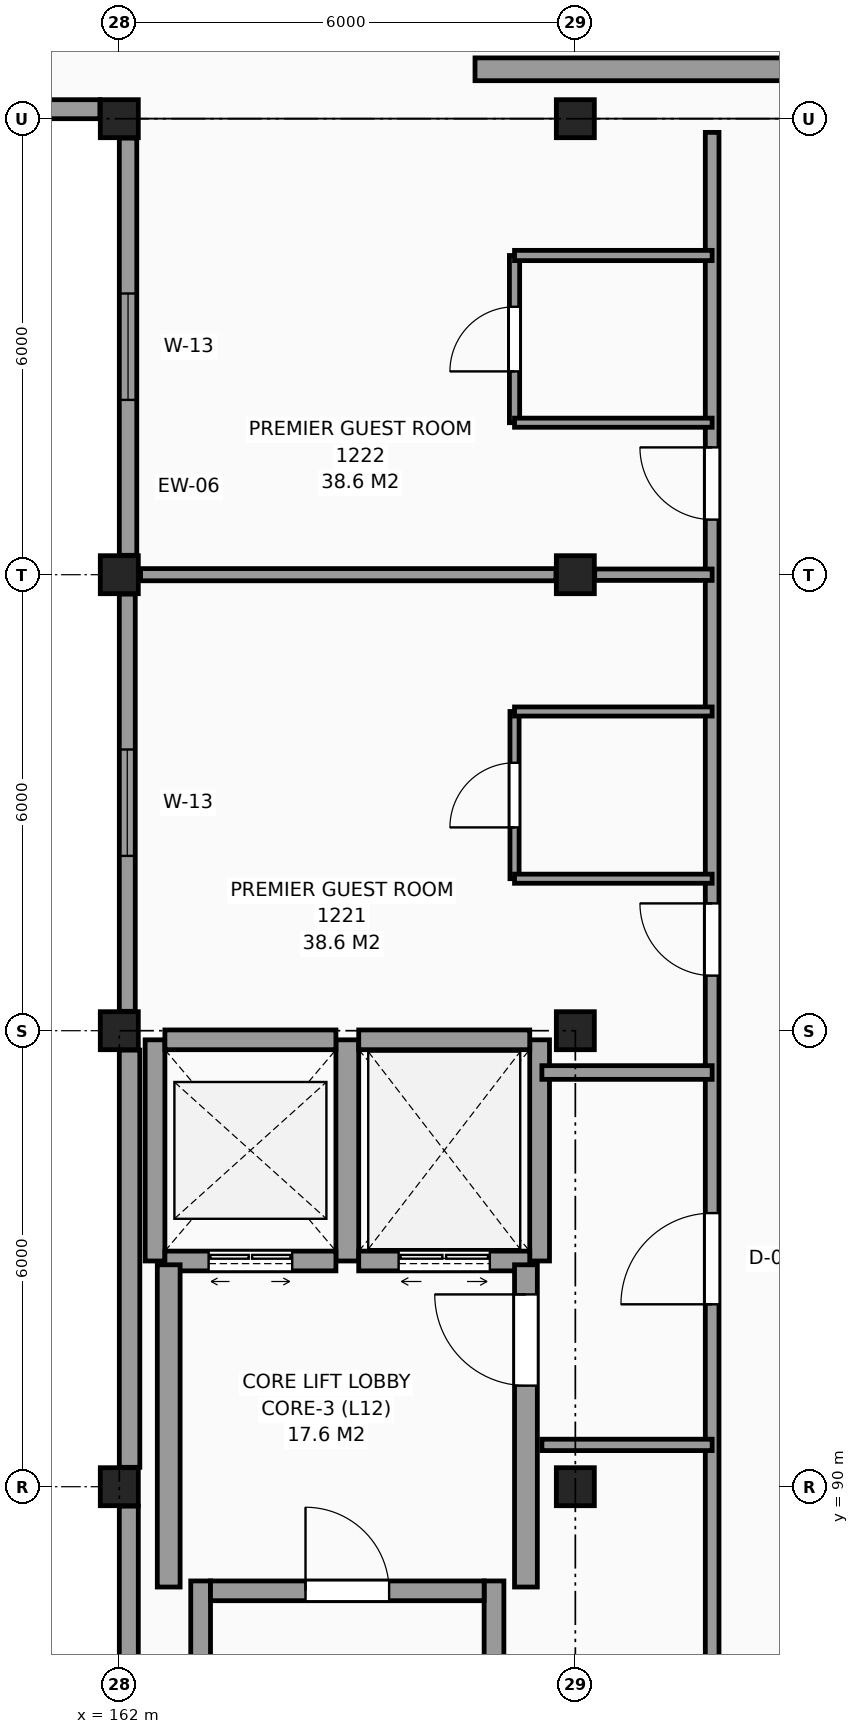
"""IFC4 building model, lengths in metres.
Left out: names, types, materials, properties, quantities, classifications, styles, units other than length and angle.
Written with IfcOpenShell. Run it as: python <this file> out.ifc"""

import sys

from ifc_helpers import new_model, si_unit, direction, frame, frame_2d, origin, origin_2d, place, context, subcontext, project, spatial, rectangle, extrude, element, fill, save


model = new_model("IFC4")
c1 = context("Model", 3, precision=1e-05, world=origin(), true_north=direction((0.0, 1.0)))
c2 = subcontext(c1, "Body", "Model", "MODEL_VIEW")
j1 = project(units=[si_unit("LENGTHUNIT", "METRE"), si_unit("PLANEANGLEUNIT", "RADIAN")], contexts=[c1])
p1 = place(None, origin())
s1 = spatial("IfcSite", under=j1, at=p1, CompositionType="ELEMENT")
p2 = place(p1, origin())
s2 = spatial("IfcBuilding", under=s1, at=p2, CompositionType="ELEMENT")
p3 = place(p2, frame((0.0, 0.0, 48.0)))
s3 = spatial("IfcBuildingStorey", under=s2, at=p3, CompositionType="ELEMENT", Elevation=48.0)
for number, where, z_axis, x_axis in (
    (1, (162.0, 90.0, 0.0), (0.0, 0.0, 1.0), (1.0, 0.0, 0.0)),
    (2, (162.0, 96.0, 0.0), (0.0, 0.0, 1.0), (1.0, 0.0, 0.0)),
    (3, (162.0, 102.0, 0.0), (0.0, 0.0, 1.0), (1.0, 0.0, 0.0)),
    (4, (162.0, 108.0, 0.0), (0.0, 0.0, 1.0), (1.0, 0.0, 0.0)),
    (5, (168.0, 90.0, 0.0), (0.0, 0.0, 1.0), (1.0, 0.0, 0.0)),
    (6, (168.0, 96.0, 0.0), (0.0, 0.0, 1.0), (1.0, 0.0, 0.0)),
    (7, (168.0, 102.0, 0.0), (0.0, 0.0, 1.0), (1.0, 0.0, 0.0)),
    (8, (168.0, 108.0, 0.0), (0.0, 0.0, 1.0), (1.0, 0.0, 0.0)),
):
    element("IfcColumn", number, at=place(p3, frame(where, z_axis=z_axis, x_axis=x_axis)), inside=s3, PredefinedType="COLUMN", context=c2, shape_type="SweptSolid", body=[
        extrude(rectangle(XDim=0.5, YDim=0.5, at=origin_2d()), origin(), (0.0, 0.0, 1.0), 3.3),
    ])
p4 = place(p3, frame((156.255, 108.125, 0.0), z_axis=(0.0, 0.0, 1.0), x_axis=(1.0, 0.0, 0.0)))
e9 = element("IfcWall", 9, at=p4, inside=s3, PredefinedType="SOLIDWALL", context=c2, shape_type="SweptSolid", body=[
    extrude(rectangle(XDim=5.49, YDim=0.25, at=frame_2d((2.745, 0.0))), origin(), (0.0, 0.0, 1.0), 3.05),
])
p5 = place(p3, frame((162.115, 107.745, 0.0), z_axis=(0.0, 0.0, 1.0), x_axis=(0.0, -1.0, 0.0)))
e10 = element("IfcWall", 10, at=p5, inside=s3, PredefinedType="SOLIDWALL", context=c2, shape_type="SweptSolid", body=[
    extrude(rectangle(XDim=5.49, YDim=0.23, at=frame_2d((2.745, 0.0))), origin(), (0.0, 0.0, 1.0), 2.4),
])
p6 = place(p5, frame((2.045, 0.0, 0.8)))
e11 = element("IfcOpeningElement", 11, at=p6, cuts=e10, PredefinedType="OPENING", context=c2, shape_type="SweptSolid", body=[
    extrude(rectangle(XDim=1.4, YDim=1.4, at=frame_2d((0.7, 0.7))), frame((0.0, 0.125, 0.0), z_axis=(0.0, -1.0, 0.0), x_axis=(1.0, 0.0, 0.0)), (0.0, 0.0, 1.0), 0.25),
])
p7 = place(p3, frame((162.105, 101.745, 0.0), z_axis=(0.0, 0.0, 1.0), x_axis=(0.0, -1.0, 0.0)))
e12 = element("IfcWall", 12, at=p7, inside=s3, PredefinedType="SOLIDWALL", context=c2, shape_type="SweptSolid", body=[
    extrude(rectangle(XDim=5.49, YDim=0.21, at=frame_2d((2.745, 0.0))), origin(), (0.0, 0.0, 1.0), 2.4),
])
p8 = place(p7, frame((2.045, 0.0, 0.8)))
e13 = element("IfcOpeningElement", 13, at=p8, cuts=e12, PredefinedType="OPENING", context=c2, shape_type="SweptSolid", body=[
    extrude(rectangle(XDim=1.4, YDim=1.4, at=frame_2d((0.7, 0.7))), frame((0.0, 0.115, 0.0), z_axis=(0.0, -1.0, 0.0), x_axis=(1.0, 0.0, 0.0)), (0.0, 0.0, 1.0), 0.23),
])
p9 = place(p3, frame((162.135, 95.745, 0.0), z_axis=(0.0, 0.0, 1.0), x_axis=(0.0, -1.0, 0.0)))
e14 = element("IfcWall", 14, at=p9, inside=s3, PredefinedType="SOLIDWALL", context=c2, shape_type="SweptSolid", body=[
    extrude(rectangle(XDim=5.49, YDim=0.27, at=frame_2d((2.745, 0.0))), origin(), (0.0, 0.0, 1.0), 2.4),
])
p10 = place(p3, frame((162.125, 89.745, 0.0), z_axis=(0.0, 0.0, 1.0), x_axis=(0.0, -1.0, 0.0)))
e15 = element("IfcWall", 15, at=p10, inside=s3, PredefinedType="SOLIDWALL", context=c2, shape_type="SweptSolid", body=[
    extrude(rectangle(XDim=5.49, YDim=0.25, at=frame_2d((2.745, 0.0))), origin(), (0.0, 0.0, 1.0), 2.4),
])
p11 = place(p3, frame((166.68, 108.65, 0.0), z_axis=(0.0, 0.0, 1.0), x_axis=(1.0, 0.0, 0.0)))
e16 = element("IfcWall", 16, at=p11, inside=s3, PredefinedType="SHEAR", context=c2, shape_type="SweptSolid", body=[
    extrude(rectangle(XDim=4.24, YDim=0.3, at=frame_2d((2.12, 0.0))), origin(), (0.0, 0.0, 1.0), 3.3),
])
for number, where, z_axis, x_axis in (
    (17, (163.07, 78.04, 0.0), (0.0, 0.0, 1.0), (0.0, 1.0, 0.0)),
    (18, (166.93, 78.04, 0.0), (0.0, 0.0, 1.0), (0.0, 1.0, 0.0)),
):
    element("IfcWall", number, at=place(p3, frame(where, z_axis=z_axis, x_axis=x_axis)), inside=s3, PredefinedType="SHEAR", context=c2, shape_type="SweptSolid", body=[
        extrude(rectangle(XDim=10.72, YDim=0.26, at=frame_2d((5.36, 0.0))), origin(), (0.0, 0.0, 1.0), 3.3),
    ])
p12 = place(p3, frame((163.2, 88.63, 0.0), z_axis=(0.0, 0.0, 1.0), x_axis=(1.0, 0.0, 0.0)))
e19 = element("IfcWall", 19, at=p12, inside=s3, PredefinedType="SHEAR", context=c2, shape_type="SweptSolid", body=[
    extrude(rectangle(XDim=3.6, YDim=0.26, at=frame_2d((1.8, 0.0))), origin(), (0.0, 0.0, 1.0), 3.3),
])
p13 = place(p12, frame((1.25, 0.0, 0.0)))
e20 = element("IfcOpeningElement", 20, at=p13, cuts=e19, PredefinedType="OPENING", context=c2, shape_type="SweptSolid", body=[
    extrude(rectangle(XDim=1.1, YDim=2.15, at=frame_2d((0.55, 1.075))), frame((0.0, 0.14, 0.0), z_axis=(0.0, -1.0, 0.0), x_axis=(1.0, 0.0, 0.0)), (0.0, 0.0, 1.0), 0.28),
])
p14 = place(p3, frame((162.47, 92.97, 0.0), z_axis=(0.0, 0.0, 1.0), x_axis=(0.0, 1.0, 0.0)))
e21 = element("IfcWall", 21, at=p14, inside=s3, PredefinedType="SHEAR", context=c2, shape_type="SweptSolid", body=[
    extrude(rectangle(XDim=2.91, YDim=0.26, at=frame_2d((1.455, 0.0))), origin(), (0.0, 0.0, 1.0), 3.3),
])
p15 = place(p3, frame((165.0, 92.97, 0.0), z_axis=(0.0, 0.0, 1.0), x_axis=(0.0, 1.0, 0.0)))
e22 = element("IfcWall", 22, at=p15, inside=s3, PredefinedType="SHEAR", context=c2, shape_type="SweptSolid", body=[
    extrude(rectangle(XDim=2.91, YDim=0.3, at=frame_2d((1.455, 0.0))), origin(), (0.0, 0.0, 1.0), 3.3),
])
p16 = place(p3, frame((162.6, 95.88, 0.0), z_axis=(0.0, 0.0, 1.0), x_axis=(1.0, 0.0, 0.0)))
e23 = element("IfcWall", 23, at=p16, inside=s3, PredefinedType="SHEAR", context=c2, shape_type="SweptSolid", body=[
    extrude(rectangle(XDim=2.25, YDim=0.26, at=frame_2d((1.125, 0.0))), origin(), (0.0, 0.0, 1.0), 3.3),
])
p17 = place(p3, frame((162.6, 92.97, 0.0), z_axis=(0.0, 0.0, 1.0), x_axis=(1.0, 0.0, 0.0)))
e24 = element("IfcWall", 24, at=p17, inside=s3, PredefinedType="SHEAR", context=c2, shape_type="SweptSolid", body=[
    extrude(rectangle(XDim=2.25, YDim=0.26, at=frame_2d((1.125, 0.0))), origin(), (0.0, 0.0, 1.0), 3.3),
])
p18 = place(p17, frame((0.575, 0.0, 0.0)))
e25 = element("IfcOpeningElement", 25, at=p18, cuts=e24, PredefinedType="OPENING", context=c2, shape_type="SweptSolid", body=[
    extrude(rectangle(XDim=1.1, YDim=2.2, at=frame_2d((0.55, 1.1))), frame((0.0, 0.14, 0.0), z_axis=(0.0, -1.0, 0.0), x_axis=(1.0, 0.0, 0.0)), (0.0, 0.0, 1.0), 0.28),
])
p19 = place(p3, frame((167.53, 92.97, 0.0), z_axis=(0.0, 0.0, 1.0), x_axis=(0.0, 1.0, 0.0)))
e26 = element("IfcWall", 26, at=p19, inside=s3, PredefinedType="SHEAR", context=c2, shape_type="SweptSolid", body=[
    extrude(rectangle(XDim=2.91, YDim=0.26, at=frame_2d((1.455, 0.0))), origin(), (0.0, 0.0, 1.0), 3.3),
])
p20 = place(p3, frame((165.15, 95.88, 0.0), z_axis=(0.0, 0.0, 1.0), x_axis=(1.0, 0.0, 0.0)))
e27 = element("IfcWall", 27, at=p20, inside=s3, PredefinedType="SHEAR", context=c2, shape_type="SweptSolid", body=[
    extrude(rectangle(XDim=2.25, YDim=0.26, at=frame_2d((1.125, 0.0))), origin(), (0.0, 0.0, 1.0), 3.3),
])
p21 = place(p3, frame((165.15, 92.97, 0.0), z_axis=(0.0, 0.0, 1.0), x_axis=(1.0, 0.0, 0.0)))
e28 = element("IfcWall", 28, at=p21, inside=s3, PredefinedType="SHEAR", context=c2, shape_type="SweptSolid", body=[
    extrude(rectangle(XDim=2.25, YDim=0.26, at=frame_2d((1.125, 0.0))), origin(), (0.0, 0.0, 1.0), 3.3),
])
p22 = place(p21, frame((0.525, 0.0, 0.0)))
e29 = element("IfcOpeningElement", 29, at=p22, cuts=e28, PredefinedType="OPENING", context=c2, shape_type="SweptSolid", body=[
    extrude(rectangle(XDim=1.2, YDim=2.25, at=frame_2d((0.6, 1.125))), frame((0.0, 0.14, 0.0), z_axis=(0.0, -1.0, 0.0), x_axis=(1.0, 0.0, 0.0)), (0.0, 0.0, 1.0), 0.28),
])
p23 = place(p3, frame((167.35, 88.68, 0.0), z_axis=(0.0, 0.0, 1.0), x_axis=(0.0, 1.0, 0.0)))
e30 = element("IfcWall", 30, at=p23, inside=s3, PredefinedType="SHEAR", context=c2, shape_type="SweptSolid", body=[
    extrude(rectangle(XDim=4.24, YDim=0.3, at=frame_2d((2.12, 0.0))), origin(), (0.0, 0.0, 1.0), 3.3),
])
p24 = place(p23, frame((2.65, 0.0, 0.0)))
e31 = element("IfcOpeningElement", 31, at=p24, cuts=e30, PredefinedType="OPENING", context=c2, shape_type="SweptSolid", body=[
    extrude(rectangle(XDim=1.2, YDim=2.2, at=frame_2d((0.6, 1.1))), frame((0.0, 0.16, 0.0), z_axis=(0.0, -1.0, 0.0), x_axis=(1.0, 0.0, 0.0)), (0.0, 0.0, 1.0), 0.32),
])
p25 = place(p3, frame((162.65, 88.68, 0.0), z_axis=(0.0, 0.0, 1.0), x_axis=(0.0, 1.0, 0.0)))
e32 = element("IfcWall", 32, at=p25, inside=s3, PredefinedType="SHEAR", context=c2, shape_type="SweptSolid", body=[
    extrude(rectangle(XDim=4.24, YDim=0.3, at=frame_2d((2.12, 0.0))), origin(), (0.0, 0.0, 1.0), 3.3),
])
p26 = place(p3, frame((167.2, 98.0, 0.0), z_axis=(0.0, 0.0, 1.0), x_axis=(0.0, 1.0, 0.0)))
e33 = element("IfcWall", 33, at=p26, inside=s3, PredefinedType="PARTITIONING", context=c2, shape_type="SweptSolid", body=[
    extrude(rectangle(XDim=2.2, YDim=0.12, at=frame_2d((1.1, 0.0))), origin(), (0.0, 0.0, 1.0), 3.05),
])
p27 = place(p26, frame((0.675, 0.0, 0.0)))
e34 = element("IfcOpeningElement", 34, at=p27, cuts=e33, PredefinedType="OPENING", context=c2, shape_type="SweptSolid", body=[
    extrude(rectangle(XDim=0.85, YDim=2.1, at=frame_2d((0.425, 1.05))), frame((0.0, 0.07, 0.0), z_axis=(0.0, -1.0, 0.0), x_axis=(1.0, 0.0, 0.0)), (0.0, 0.0, 1.0), 0.14),
])
p28 = place(p3, frame((167.2, 104.0, 0.0), z_axis=(0.0, 0.0, 1.0), x_axis=(0.0, 1.0, 0.0)))
e35 = element("IfcWall", 35, at=p28, inside=s3, PredefinedType="PARTITIONING", context=c2, shape_type="SweptSolid", body=[
    extrude(rectangle(XDim=2.2, YDim=0.135, at=frame_2d((1.1, 0.0))), origin(), (0.0, 0.0, 1.0), 3.05),
])
p29 = place(p28, frame((0.675, 0.0, 0.0)))
e36 = element("IfcOpeningElement", 36, at=p29, cuts=e35, PredefinedType="OPENING", context=c2, shape_type="SweptSolid", body=[
    extrude(rectangle(XDim=0.85, YDim=2.1, at=frame_2d((0.425, 1.05))), frame((0.0, 0.078, 0.0), z_axis=(0.0, -1.0, 0.0), x_axis=(1.0, 0.0, 0.0)), (0.0, 0.0, 1.0), 0.155),
])
p30 = place(p3, frame((169.8, 66.235, 0.0), z_axis=(0.0, 0.0, 1.0), x_axis=(0.0, 1.0, 0.0)))
e37 = element("IfcWall", 37, at=p30, inside=s3, PredefinedType="PARTITIONING", context=c2, shape_type="SweptSolid", body=[
    extrude(rectangle(XDim=41.585, YDim=0.18, at=frame_2d((20.792, 0.0))), origin(), (0.0, 0.0, 1.0), 3.05),
])
p31 = place(p30, frame((26.165, 0.0, 0.0)))
e38 = element("IfcOpeningElement", 38, at=p31, cuts=e37, PredefinedType="OPENING", context=c2, shape_type="SweptSolid", body=[
    extrude(rectangle(XDim=1.2, YDim=2.2, at=frame_2d((0.6, 1.1))), frame((0.0, 0.1, 0.0), z_axis=(0.0, -1.0, 0.0), x_axis=(1.0, 0.0, 0.0)), (0.0, 0.0, 1.0), 0.2),
])
p32 = place(p30, frame((0.44, 0.0, 0.0)))
e39 = element("IfcOpeningElement", 39, at=p32, cuts=e37, PredefinedType="OPENING", context=c2, shape_type="SweptSolid", body=[
    extrude(rectangle(XDim=0.95, YDim=2.1, at=frame_2d((0.475, 1.05))), frame((0.0, 0.1, 0.0), z_axis=(0.0, -1.0, 0.0), x_axis=(1.0, 0.0, 0.0)), (0.0, 0.0, 1.0), 0.2),
])
p33 = place(p30, frame((6.49, 0.0, 0.0)))
e40 = element("IfcOpeningElement", 40, at=p33, cuts=e37, PredefinedType="OPENING", context=c2, shape_type="SweptSolid", body=[
    extrude(rectangle(XDim=0.95, YDim=2.1, at=frame_2d((0.475, 1.05))), frame((0.0, 0.1, 0.0), z_axis=(0.0, -1.0, 0.0), x_axis=(1.0, 0.0, 0.0)), (0.0, 0.0, 1.0), 0.2),
])
p34 = place(p30, frame((30.49, 0.0, 0.0)))
e41 = element("IfcOpeningElement", 41, at=p34, cuts=e37, PredefinedType="OPENING", context=c2, shape_type="SweptSolid", body=[
    extrude(rectangle(XDim=0.95, YDim=2.1, at=frame_2d((0.475, 1.05))), frame((0.0, 0.1, 0.0), z_axis=(0.0, -1.0, 0.0), x_axis=(1.0, 0.0, 0.0)), (0.0, 0.0, 1.0), 0.2),
])
p35 = place(p30, frame((36.49, 0.0, 0.0)))
e42 = element("IfcOpeningElement", 42, at=p35, cuts=e37, PredefinedType="OPENING", context=c2, shape_type="SweptSolid", body=[
    extrude(rectangle(XDim=0.95, YDim=2.1, at=frame_2d((0.475, 1.05))), frame((0.0, 0.1, 0.0), z_axis=(0.0, -1.0, 0.0), x_axis=(1.0, 0.0, 0.0)), (0.0, 0.0, 1.0), 0.2),
])
p36 = place(p3, frame((167.56, 90.55, 0.0), z_axis=(0.0, 0.0, 1.0), x_axis=(1.0, 0.0, 0.0)))
e43 = element("IfcWall", 43, at=p36, inside=s3, PredefinedType="PARTITIONING", context=c2, shape_type="SweptSolid", body=[
    extrude(rectangle(XDim=2.24, YDim=0.15, at=frame_2d((1.12, 0.0))), origin(), (0.0, 0.0, 1.0), 3.05),
])
p37 = place(p3, frame((167.56, 95.45, 0.0), z_axis=(0.0, 0.0, 1.0), x_axis=(1.0, 0.0, 0.0)))
e44 = element("IfcWall", 44, at=p37, inside=s3, PredefinedType="PARTITIONING", context=c2, shape_type="SweptSolid", body=[
    extrude(rectangle(XDim=2.24, YDim=0.18, at=frame_2d((1.12, 0.0))), origin(), (0.0, 0.0, 1.0), 3.05),
])
for number, where, z_axis, x_axis in (
    (45, (167.2, 98.0, 0.0), (0.0, 0.0, 1.0), (1.0, 0.0, 0.0)),
    (46, (167.2, 100.2, 0.0), (0.0, 0.0, 1.0), (1.0, 0.0, 0.0)),
):
    element("IfcWall", number, at=place(p3, frame(where, z_axis=z_axis, x_axis=x_axis)), inside=s3, PredefinedType="PARTITIONING", context=c2, shape_type="SweptSolid", body=[
        extrude(rectangle(XDim=2.6, YDim=0.12, at=frame_2d((1.3, 0.0))), origin(), (0.0, 0.0, 1.0), 3.05),
    ])
p38 = place(p3, frame((162.28, 102.0, 0.0), z_axis=(0.0, 0.0, 1.0), x_axis=(1.0, 0.0, 0.0)))
e47 = element("IfcWall", 47, at=p38, inside=s3, PredefinedType="PARTITIONING", context=c2, shape_type="SweptSolid", body=[
    extrude(rectangle(XDim=5.465, YDim=0.16, at=frame_2d((2.732, 0.0))), origin(), (0.0, 0.0, 1.0), 2.25),
])
p39 = place(p3, frame((168.255, 102.0, 0.0), z_axis=(0.0, 0.0, 1.0), x_axis=(1.0, 0.0, 0.0)))
e48 = element("IfcWall", 48, at=p39, inside=s3, PredefinedType="PARTITIONING", context=c2, shape_type="SweptSolid", body=[
    extrude(rectangle(XDim=1.545, YDim=0.15, at=frame_2d((0.772, 0.0))), origin(), (0.0, 0.0, 1.0), 2.35),
])
p40 = place(p3, frame((167.2, 104.0, 0.0), z_axis=(0.0, 0.0, 1.0), x_axis=(1.0, 0.0, 0.0)))
e49 = element("IfcWall", 49, at=p40, inside=s3, PredefinedType="PARTITIONING", context=c2, shape_type="SweptSolid", body=[
    extrude(rectangle(XDim=2.6, YDim=0.12, at=frame_2d((1.3, 0.0))), origin(), (0.0, 0.0, 1.0), 3.05),
])
p41 = place(p3, frame((167.2, 106.2, 0.0), z_axis=(0.0, 0.0, 1.0), x_axis=(1.0, 0.0, 0.0)))
e50 = element("IfcWall", 50, at=p41, inside=s3, PredefinedType="PARTITIONING", context=c2, shape_type="SweptSolid", body=[
    extrude(rectangle(XDim=2.6, YDim=0.135, at=frame_2d((1.3, 0.0))), origin(), (0.0, 0.0, 1.0), 3.05),
])
p42 = place(p8, origin())
e51 = element("IfcWindow", 51, at=p42, inside=s3, PartitioningType="SINGLE_PANEL", PredefinedType="WINDOW", context=c2, shape_type="SweptSolid", body=[
    extrude(rectangle(XDim=1.4, YDim=1.4, at=frame_2d((0.7, 0.7))), frame((0.0, 0.03, 0.0), z_axis=(0.0, -1.0, 0.0), x_axis=(1.0, 0.0, 0.0)), (0.0, 0.0, 1.0), 0.06),
])
fill(e13, e51)
p43 = place(p6, origin())
e52 = element("IfcWindow", 52, at=p43, inside=s3, PartitioningType="SINGLE_PANEL", PredefinedType="WINDOW", context=c2, shape_type="SweptSolid", body=[
    extrude(rectangle(XDim=1.4, YDim=1.4, at=frame_2d((0.7, 0.7))), frame((0.0, 0.03, 0.0), z_axis=(0.0, -1.0, 0.0), x_axis=(1.0, 0.0, 0.0)), (0.0, 0.0, 1.0), 0.06),
])
fill(e11, e52)
p44 = place(p13, origin())
e53 = element("IfcDoor", 53, at=p44, inside=s3, OperationType="SINGLE_SWING_LEFT", PredefinedType="DOOR", context=c2, shape_type="SweptSolid", body=[
    extrude(rectangle(XDim=1.1, YDim=2.15, at=frame_2d((0.55, 1.075))), frame((0.0, 0.025, 0.0), z_axis=(0.0, -1.0, 0.0), x_axis=(1.0, 0.0, 0.0)), (0.0, 0.0, 1.0), 0.05),
])
fill(e20, e53)
p45 = place(p18, origin())
e54 = element("IfcDoor", 54, at=p45, inside=s3, OperationType="DOUBLE_DOOR_SLIDING", PredefinedType="DOOR", context=c2, shape_type="SweptSolid", body=[
    extrude(rectangle(XDim=1.1, YDim=2.2, at=frame_2d((0.55, 1.1))), frame((0.0, 0.025, 0.0), z_axis=(0.0, -1.0, 0.0), x_axis=(1.0, 0.0, 0.0)), (0.0, 0.0, 1.0), 0.05),
])
fill(e25, e54)
p46 = place(p22, origin())
e55 = element("IfcDoor", 55, at=p46, inside=s3, OperationType="DOUBLE_DOOR_SLIDING", PredefinedType="DOOR", context=c2, shape_type="SweptSolid", body=[
    extrude(rectangle(XDim=1.2, YDim=2.25, at=frame_2d((0.6, 1.125))), frame((0.0, 0.025, 0.0), z_axis=(0.0, -1.0, 0.0), x_axis=(1.0, 0.0, 0.0)), (0.0, 0.0, 1.0), 0.05),
])
fill(e29, e55)
p47 = place(p24, origin())
e56 = element("IfcDoor", 56, at=p47, inside=s3, OperationType="SINGLE_SWING_RIGHT", PredefinedType="DOOR", context=c2, shape_type="SweptSolid", body=[
    extrude(rectangle(XDim=1.2, YDim=2.2, at=frame_2d((0.6, 1.1))), frame((0.0, 0.025, 0.0), z_axis=(0.0, -1.0, 0.0), x_axis=(1.0, 0.0, 0.0)), (0.0, 0.0, 1.0), 0.05),
])
fill(e31, e56)
p48 = place(p31, origin())
e57 = element("IfcDoor", 57, at=p48, inside=s3, OperationType="SINGLE_SWING_LEFT", PredefinedType="DOOR", context=c2, shape_type="SweptSolid", body=[
    extrude(rectangle(XDim=1.2, YDim=2.2, at=frame_2d((0.6, 1.1))), frame((0.0, 0.025, 0.0), z_axis=(0.0, -1.0, 0.0), x_axis=(1.0, 0.0, 0.0)), (0.0, 0.0, 1.0), 0.05),
])
fill(e38, e57)
p49 = place(p27, origin())
e58 = element("IfcDoor", 58, at=p49, inside=s3, OperationType="SINGLE_SWING_LEFT", PredefinedType="DOOR", context=c2, shape_type="SweptSolid", body=[
    extrude(rectangle(XDim=0.85, YDim=2.1, at=frame_2d((0.425, 1.05))), frame((0.0, 0.025, 0.0), z_axis=(0.0, -1.0, 0.0), x_axis=(1.0, 0.0, 0.0)), (0.0, 0.0, 1.0), 0.05),
])
fill(e34, e58)
p50 = place(p34, origin())
e59 = element("IfcDoor", 59, at=p50, inside=s3, OperationType="SINGLE_SWING_RIGHT", PredefinedType="DOOR", context=c2, shape_type="SweptSolid", body=[
    extrude(rectangle(XDim=0.95, YDim=2.1, at=frame_2d((0.475, 1.05))), frame((0.0, 0.025, 0.0), z_axis=(0.0, -1.0, 0.0), x_axis=(1.0, 0.0, 0.0)), (0.0, 0.0, 1.0), 0.05),
])
fill(e41, e59)
p51 = place(p29, origin())
e60 = element("IfcDoor", 60, at=p51, inside=s3, OperationType="SINGLE_SWING_LEFT", PredefinedType="DOOR", context=c2, shape_type="SweptSolid", body=[
    extrude(rectangle(XDim=0.85, YDim=2.1, at=frame_2d((0.425, 1.05))), frame((0.0, 0.025, 0.0), z_axis=(0.0, -1.0, 0.0), x_axis=(1.0, 0.0, 0.0)), (0.0, 0.0, 1.0), 0.05),
])
fill(e36, e60)
p52 = place(p35, origin())
e61 = element("IfcDoor", 61, at=p52, inside=s3, OperationType="SINGLE_SWING_RIGHT", PredefinedType="DOOR", context=c2, shape_type="SweptSolid", body=[
    extrude(rectangle(XDim=0.95, YDim=2.1, at=frame_2d((0.475, 1.05))), frame((0.0, 0.025, 0.0), z_axis=(0.0, -1.0, 0.0), x_axis=(1.0, 0.0, 0.0)), (0.0, 0.0, 1.0), 0.05),
])
fill(e42, e61)
save(model, sys.argv[1])
